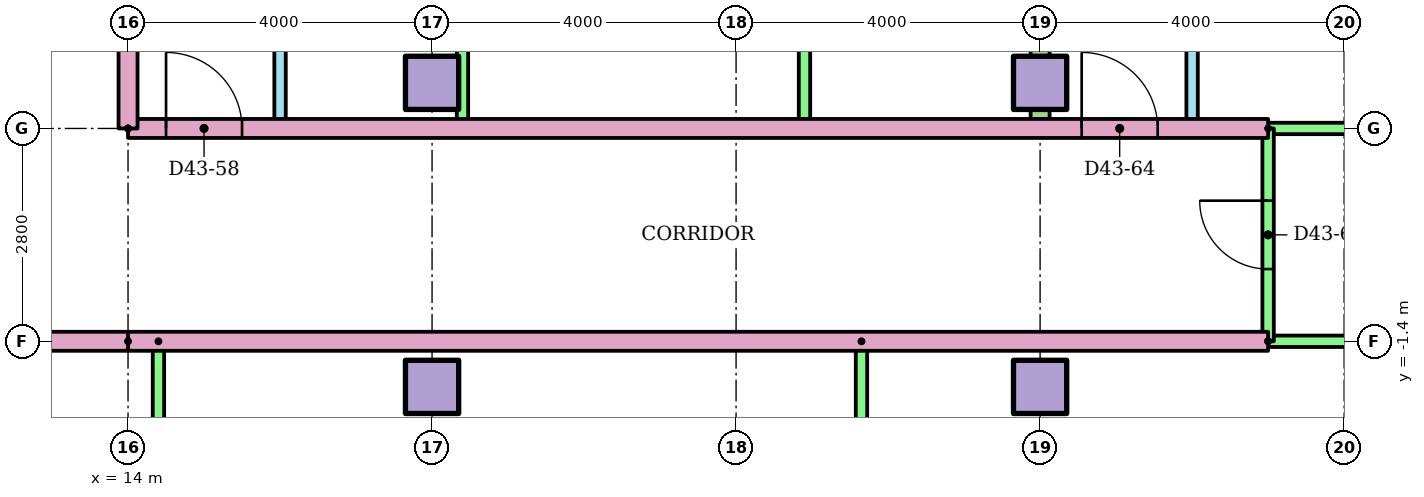
"""IFC4 building model, lengths in metres.
Left out: names, types, materials, properties, quantities, classifications, styles, units other than length and angle.
Written with IfcOpenShell. Run it as: python <this file> out.ifc"""

import sys

from ifc_helpers import new_model, si_unit, direction, frame, frame_2d, origin, origin_2d, place, context, subcontext, project, spatial, rectangle, extrude, element, fill, save


model = new_model("IFC4")
c1 = context("Model", 3, precision=1e-05, world=origin(), true_north=direction((0.0, 1.0)))
c2 = subcontext(c1, "Body", "Model", "MODEL_VIEW")
j1 = project(units=[si_unit("LENGTHUNIT", "METRE"), si_unit("PLANEANGLEUNIT", "RADIAN")], contexts=[c1])
p1 = place(None, origin())
s1 = spatial("IfcSite", under=j1, at=p1, CompositionType="ELEMENT")
p2 = place(p1, origin())
s2 = spatial("IfcBuilding", under=s1, at=p2, CompositionType="ELEMENT")
p3 = place(p2, frame((0.0, 0.0, 168.5)))
s3 = spatial("IfcBuildingStorey", under=s2, at=p3, CompositionType="ELEMENT", Elevation=168.5)
for number, where in (
    (1, (18.0, -2.0, 0.0)),
    (2, (26.0, -2.0, 0.0)),
    (3, (18.0, 2.0, 0.0)),
    (4, (26.0, 2.0, 0.0)),
):
    element("IfcColumn", number, at=place(p3, frame(where)), inside=s3, PredefinedType="COLUMN", context=c2, shape_type="SweptSolid", body=[
        extrude(rectangle(XDim=0.7, YDim=0.7, at=origin_2d()), origin(), (0.0, 0.0, 1.0), 3.2),
    ])
for number, where, z_axis, x_axis in (
    (5, (14.4, -1.4, 0.0), (0.0, 0.0, 1.0), (0.0, -1.0, 0.0)),
    (6, (23.65, -1.4, 0.0), (0.0, 0.0, 1.0), (0.0, -1.0, 0.0)),
):
    element("IfcWall", number, at=place(p3, frame(where, z_axis=z_axis, x_axis=x_axis)), inside=s3, PredefinedType="PARTITIONING", context=c2, shape_type="SweptSolid", body=[
        extrude(rectangle(XDim=6.7, YDim=0.15, at=frame_2d((3.35, 0.0))), origin(), (0.0, 0.0, 1.0), 2.4),
    ])
p4 = place(p3, frame((29.0, -1.4, 0.0), z_axis=(0.0, 0.0, 1.0), x_axis=(-1.0, 0.0, 0.0)))
e7 = element("IfcWall", 7, at=p4, inside=s3, PredefinedType="PARTITIONING", context=c2, shape_type="SweptSolid", body=[
    extrude(rectangle(XDim=15.0, YDim=0.25, at=frame_2d((7.5, 0.0))), origin(), (0.0, 0.0, 1.0), 2.4),
])
p5 = place(p3, frame((36.82, -1.4, 0.0), z_axis=(0.0, 0.0, 1.0), x_axis=(-1.0, 0.0, 0.0)))
e8 = element("IfcWall", 8, at=p5, inside=s3, PredefinedType="PARTITIONING", context=c2, shape_type="SweptSolid", body=[
    extrude(rectangle(XDim=7.82, YDim=0.15, at=frame_2d((3.91, 0.0))), origin(), (0.0, 0.0, 1.0), 2.4),
])
p6 = place(p3, frame((16.0, 10.5, 0.0), z_axis=(0.0, 0.0, 1.0), x_axis=(0.0, -1.0, 0.0)))
e9 = element("IfcWall", 9, at=p6, inside=s3, PredefinedType="PARTITIONING", context=c2, shape_type="SweptSolid", body=[
    extrude(rectangle(XDim=9.1, YDim=0.15, at=frame_2d((4.55, 0.0))), origin(), (0.0, 0.0, 1.0), 2.4),
])
p7 = place(p6, frame((6.15, 0.0, 0.0)))
e10 = element("IfcOpeningElement", 10, at=p7, cuts=e9, PredefinedType="OPENING", context=c2, shape_type="SweptSolid", body=[
    extrude(rectangle(XDim=0.9, YDim=2.1, at=frame_2d((0.45, 1.05))), frame((0.0, 0.085, 0.0), z_axis=(0.0, -1.0, 0.0), x_axis=(1.0, 0.0, 0.0)), (0.0, 0.0, 1.0), 0.17),
])
p8 = place(p6, frame((1.65, 0.0, 0.0)))
e11 = element("IfcOpeningElement", 11, at=p8, cuts=e9, PredefinedType="OPENING", context=c2, shape_type="SweptSolid", body=[
    extrude(rectangle(XDim=0.8, YDim=2.1, at=frame_2d((0.4, 1.05))), frame((0.0, 0.085, 0.0), z_axis=(0.0, -1.0, 0.0), x_axis=(1.0, 0.0, 0.0)), (0.0, 0.0, 1.0), 0.17),
])
for number, where, z_axis, x_axis in (
    (12, (18.4, 10.5, 0.0), (0.0, 0.0, 1.0), (0.0, -1.0, 0.0)),
    (13, (22.9, 10.5, 0.0), (0.0, 0.0, 1.0), (0.0, -1.0, 0.0)),
):
    element("IfcWall", number, at=place(p3, frame(where, z_axis=z_axis, x_axis=x_axis)), inside=s3, PredefinedType="PARTITIONING", context=c2, shape_type="SweptSolid", body=[
        extrude(rectangle(XDim=9.1, YDim=0.15, at=frame_2d((4.55, 0.0))), origin(), (0.0, 0.0, 1.0), 2.4),
    ])
p9 = place(p3, frame((28.0, 10.5, 0.0), z_axis=(0.0, 0.0, 1.0), x_axis=(0.0, -1.0, 0.0)))
e14 = element("IfcWall", 14, at=p9, inside=s3, PredefinedType="PARTITIONING", context=c2, shape_type="SweptSolid", body=[
    extrude(rectangle(XDim=9.1, YDim=0.15, at=frame_2d((4.55, 0.0))), origin(), (0.0, 0.0, 1.0), 2.4),
])
p10 = place(p9, frame((6.15, 0.0, 0.0)))
e15 = element("IfcOpeningElement", 15, at=p10, cuts=e14, PredefinedType="OPENING", context=c2, shape_type="SweptSolid", body=[
    extrude(rectangle(XDim=0.9, YDim=2.1, at=frame_2d((0.45, 1.05))), frame((0.0, 0.085, 0.0), z_axis=(0.0, -1.0, 0.0), x_axis=(1.0, 0.0, 0.0)), (0.0, 0.0, 1.0), 0.17),
])
p11 = place(p9, frame((1.65, 0.0, 0.0)))
e16 = element("IfcOpeningElement", 16, at=p11, cuts=e14, PredefinedType="OPENING", context=c2, shape_type="SweptSolid", body=[
    extrude(rectangle(XDim=0.8, YDim=2.1, at=frame_2d((0.4, 1.05))), frame((0.0, 0.085, 0.0), z_axis=(0.0, -1.0, 0.0), x_axis=(1.0, 0.0, 0.0)), (0.0, 0.0, 1.0), 0.17),
])
p12 = place(p3, frame((26.0, 18.821, 0.0), z_axis=(0.0, 0.0, 1.0), x_axis=(0.0, -1.0, 0.0)))
e17 = element("IfcWall", 17, at=p12, inside=s3, PredefinedType="PARTITIONING", context=c2, shape_type="SweptSolid", body=[
    extrude(rectangle(XDim=17.421, YDim=0.25, at=frame_2d((8.71, 0.0))), origin(), (0.0, 0.0, 1.0), 2.4),
])
p13 = place(p3, frame((14.0, 1.4, 0.0)))
e18 = element("IfcWall", 18, at=p13, inside=s3, PredefinedType="PARTITIONING", context=c2, shape_type="SweptSolid", body=[
    extrude(rectangle(XDim=15.0, YDim=0.25, at=frame_2d((7.5, 0.0))), origin(), (0.0, 0.0, 1.0), 2.4),
])
p14 = place(p13, frame((0.5, 0.0, 0.0)))
e19 = element("IfcOpeningElement", 19, at=p14, cuts=e18, PredefinedType="OPENING", context=c2, shape_type="SweptSolid", body=[
    extrude(rectangle(XDim=1.0, YDim=2.1, at=frame_2d((0.5, 1.05))), frame((0.0, 0.135, 0.0), z_axis=(0.0, -1.0, 0.0), x_axis=(1.0, 0.0, 0.0)), (0.0, 0.0, 1.0), 0.27),
])
p15 = place(p13, frame((12.547, 0.0, 0.0)))
e20 = element("IfcOpeningElement", 20, at=p15, cuts=e18, PredefinedType="OPENING", context=c2, shape_type="SweptSolid", body=[
    extrude(rectangle(XDim=1.0, YDim=2.1, at=frame_2d((0.5, 1.05))), frame((0.0, 0.135, 0.0), z_axis=(0.0, -1.0, 0.0), x_axis=(1.0, 0.0, 0.0)), (0.0, 0.0, 1.0), 0.27),
])
p16 = place(p3, frame((29.0, 1.4, 0.0)))
e21 = element("IfcWall", 21, at=p16, inside=s3, PredefinedType="PARTITIONING", context=c2, shape_type="SweptSolid", body=[
    extrude(rectangle(XDim=7.82, YDim=0.15, at=frame_2d((3.91, 0.0))), origin(), (0.0, 0.0, 1.0), 2.4),
])
p17 = place(p3, frame((29.0, -1.4, 0.0), z_axis=(0.0, 0.0, 1.0), x_axis=(0.0, 1.0, 0.0)))
e22 = element("IfcWall", 22, at=p17, inside=s3, PredefinedType="PARTITIONING", context=c2, shape_type="SweptSolid", body=[
    extrude(rectangle(XDim=2.8, YDim=0.15, at=frame_2d((1.4, 0.0))), origin(), (0.0, 0.0, 1.0), 2.4),
])
p18 = place(p17, frame((0.95, 0.0, 0.0)))
e23 = element("IfcOpeningElement", 23, at=p18, cuts=e22, PredefinedType="OPENING", context=c2, shape_type="SweptSolid", body=[
    extrude(rectangle(XDim=0.9, YDim=2.1, at=frame_2d((0.45, 1.05))), frame((0.0, 0.085, 0.0), z_axis=(0.0, -1.0, 0.0), x_axis=(1.0, 0.0, 0.0)), (0.0, 0.0, 1.0), 0.17),
])
p19 = place(p3, frame((14.0, -1.4, 0.0), z_axis=(0.0, 0.0, 1.0), x_axis=(-1.0, 0.0, 0.0)))
e24 = element("IfcWall", 24, at=p19, inside=s3, PredefinedType="PARTITIONING", context=c2, shape_type="SweptSolid", body=[
    extrude(rectangle(XDim=28.0, YDim=0.25, at=frame_2d((14.0, 0.0))), origin(), (0.0, 0.0, 1.0), 2.4),
])
p20 = place(p19, frame((20.547, 0.0, 0.0)))
e25 = element("IfcOpeningElement", 25, at=p20, cuts=e24, PredefinedType="OPENING", context=c2, shape_type="SweptSolid", body=[
    extrude(rectangle(XDim=1.0, YDim=2.1, at=frame_2d((0.5, 1.05))), frame((0.0, 0.135, 0.0), z_axis=(0.0, -1.0, 0.0), x_axis=(1.0, 0.0, 0.0)), (0.0, 0.0, 1.0), 0.27),
])
p21 = place(p19, frame((18.453, 0.0, 0.0)))
e26 = element("IfcOpeningElement", 26, at=p21, cuts=e24, PredefinedType="OPENING", context=c2, shape_type="SweptSolid", body=[
    extrude(rectangle(XDim=1.0, YDim=2.1, at=frame_2d((0.5, 1.05))), frame((0.0, 0.135, 0.0), z_axis=(0.0, -1.0, 0.0), x_axis=(1.0, 0.0, 0.0)), (0.0, 0.0, 1.0), 0.27),
])
p22 = place(p19, frame((2.453, 0.0, 0.0)))
e27 = element("IfcOpeningElement", 27, at=p22, cuts=e24, PredefinedType="OPENING", context=c2, shape_type="SweptSolid", body=[
    extrude(rectangle(XDim=1.0, YDim=2.1, at=frame_2d((0.5, 1.05))), frame((0.0, 0.135, 0.0), z_axis=(0.0, -1.0, 0.0), x_axis=(1.0, 0.0, 0.0)), (0.0, 0.0, 1.0), 0.27),
])
p23 = place(p3, frame((14.0, 1.4, 0.0), z_axis=(0.0, 0.0, 1.0), x_axis=(0.0, 1.0, 0.0)))
e28 = element("IfcWall", 28, at=p23, inside=s3, PredefinedType="PARTITIONING", context=c2, shape_type="SweptSolid", body=[
    extrude(rectangle(XDim=1.6, YDim=0.25, at=frame_2d((0.8, 0.0))), origin(), (0.0, 0.0, 1.0), 2.4),
])
p24 = place(p14, origin())
e29 = element("IfcDoor", 29, at=p24, inside=s3, OperationType="SINGLE_SWING_LEFT", PredefinedType="DOOR", context=c2, shape_type="SweptSolid", body=[
    extrude(rectangle(XDim=1.0, YDim=2.1, at=frame_2d((0.5, 1.05))), frame((0.0, 0.025, 0.0), z_axis=(0.0, -1.0, 0.0), x_axis=(1.0, 0.0, 0.0)), (0.0, 0.0, 1.0), 0.05),
])
fill(e19, e29)
p25 = place(p15, origin())
e30 = element("IfcDoor", 30, at=p25, inside=s3, OperationType="SINGLE_SWING_LEFT", PredefinedType="DOOR", context=c2, shape_type="SweptSolid", body=[
    extrude(rectangle(XDim=1.0, YDim=2.1, at=frame_2d((0.5, 1.05))), frame((0.0, 0.025, 0.0), z_axis=(0.0, -1.0, 0.0), x_axis=(1.0, 0.0, 0.0)), (0.0, 0.0, 1.0), 0.05),
])
fill(e20, e30)
p26 = place(p18, origin())
e31 = element("IfcDoor", 31, at=p26, inside=s3, OperationType="SINGLE_SWING_RIGHT", PredefinedType="DOOR", context=c2, shape_type="SweptSolid", body=[
    extrude(rectangle(XDim=0.9, YDim=2.1, at=frame_2d((0.45, 1.05))), frame((0.0, 0.025, 0.0), z_axis=(0.0, -1.0, 0.0), x_axis=(1.0, 0.0, 0.0)), (0.0, 0.0, 1.0), 0.05),
])
fill(e23, e31)
save(model, sys.argv[1])
